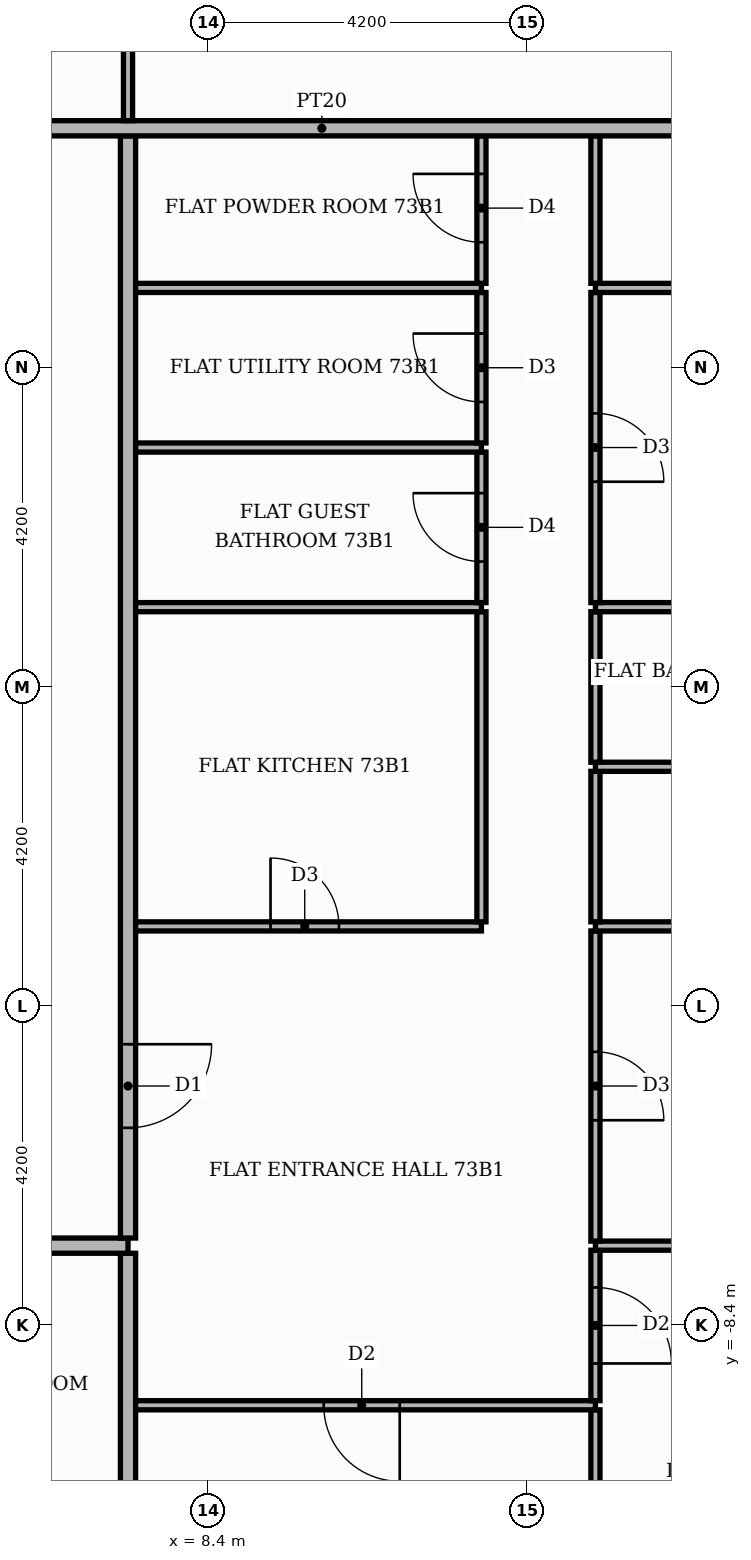
"""IFC4 building model, lengths in metres.
Left out: names, types, materials, properties, quantities, classifications, styles, units other than length and angle.
Written with IfcOpenShell. Run it as: python <this file> out.ifc"""

import sys

from ifc_helpers import new_model, si_unit, direction, frame, frame_2d, origin, place, context, subcontext, project, spatial, rectangle, extrude, element, fill, save


model = new_model("IFC4")
c1 = context("Model", 3, precision=1e-05, world=origin(), true_north=direction((0.0, 1.0)))
c2 = subcontext(c1, "Body", "Model", "MODEL_VIEW")
j1 = project(units=[si_unit("LENGTHUNIT", "METRE"), si_unit("PLANEANGLEUNIT", "RADIAN")], contexts=[c1])
p1 = place(None, origin())
s1 = spatial("IfcSite", under=j1, at=p1, CompositionType="ELEMENT")
p2 = place(p1, origin())
s2 = spatial("IfcBuilding", under=s1, at=p2, CompositionType="ELEMENT")
p3 = place(p2, frame((0.0, 0.0, 304.5)))
s3 = spatial("IfcBuildingStorey", under=s2, at=p3, CompositionType="ELEMENT", Elevation=304.5)
p4 = place(p3, frame((7.35, -18.5, 0.0), z_axis=(0.0, 0.0, 1.0), x_axis=(0.0, 1.0, 0.0)))
e1 = element("IfcWall", 1, at=p4, inside=s3, PredefinedType="PARTITIONING", context=c2, shape_type="SweptSolid", body=[
    extrude(rectangle(XDim=11.05, YDim=0.2, at=frame_2d((5.525, 0.0))), origin(), (0.0, 0.0, 1.0), 3.55),
])
p5 = place(p3, frame((13.5, -13.0, 0.0), z_axis=(0.0, 0.0, 1.0), x_axis=(0.0, 1.0, 0.0)))
e2 = element("IfcWall", 2, at=p5, inside=s3, PredefinedType="PARTITIONING", context=c2, shape_type="SweptSolid", body=[
    extrude(rectangle(XDim=3.49, YDim=0.12, at=frame_2d((1.745, 0.0))), origin(), (0.0, 0.0, 1.0), 3.55),
])
p6 = place(p3, frame((7.45, -9.45, 0.0), z_axis=(0.0, 0.0, 1.0), x_axis=(1.0, 0.0, 0.0)))
e3 = element("IfcWall", 3, at=p6, inside=s3, PredefinedType="PARTITIONING", context=c2, shape_type="SweptSolid", body=[
    extrude(rectangle(XDim=6.05, YDim=0.12, at=frame_2d((3.025, 0.0))), origin(), (0.0, 0.0, 1.0), 3.55),
])
p7 = place(p6, frame((2.475, 0.0, 0.0)))
e4 = element("IfcOpeningElement", 4, at=p7, cuts=e3, PredefinedType="OPENING", context=c2, shape_type="SweptSolid", body=[
    extrude(rectangle(XDim=1.0, YDim=2.1, at=frame_2d((0.5, 1.05))), frame((0.0, 0.07, 0.0), z_axis=(0.0, -1.0, 0.0), x_axis=(1.0, 0.0, 0.0)), (0.0, 0.0, 1.0), 0.14),
])
p8 = place(p3, frame((13.5, -9.39, 0.0), z_axis=(0.0, 0.0, 1.0), x_axis=(0.0, 1.0, 0.0)))
e5 = element("IfcWall", 5, at=p8, inside=s3, PredefinedType="PARTITIONING", context=c2, shape_type="SweptSolid", body=[
    extrude(rectangle(XDim=1.98, YDim=0.12, at=frame_2d((0.99, 0.0))), origin(), (0.0, 0.0, 1.0), 3.55),
])
p9 = place(p8, frame((0.49, 0.0, 0.0)))
e6 = element("IfcOpeningElement", 6, at=p9, cuts=e5, PredefinedType="OPENING", context=c2, shape_type="SweptSolid", body=[
    extrude(rectangle(XDim=1.0, YDim=2.1, at=frame_2d((0.5, 1.05))), frame((0.0, 0.07, 0.0), z_axis=(0.0, -1.0, 0.0), x_axis=(1.0, 0.0, 0.0)), (0.0, 0.0, 1.0), 0.14),
])
p10 = place(p3, frame((-18.5, -7.35, 0.0), z_axis=(0.0, 0.0, 1.0), x_axis=(1.0, 0.0, 0.0)))
e7 = element("IfcWall", 7, at=p10, inside=s3, PredefinedType="PARTITIONING", context=c2, shape_type="SweptSolid", body=[
    extrude(rectangle(XDim=25.85, YDim=0.2, at=frame_2d((12.925, 0.0))), origin(), (0.0, 0.0, 1.0), 3.55),
])
p11 = place(p10, frame((12.7, 0.0, 0.0)))
e8 = element("IfcOpeningElement", 8, at=p11, cuts=e7, PredefinedType="OPENING", context=c2, shape_type="SweptSolid", body=[
    extrude(rectangle(XDim=1.1, YDim=2.4, at=frame_2d((0.55, 1.2))), frame((0.0, 0.11, 0.0), z_axis=(0.0, -1.0, 0.0), x_axis=(1.0, 0.0, 0.0)), (0.0, 0.0, 1.0), 0.22),
])
p12 = place(p3, frame((13.5, -7.35, 0.0), z_axis=(0.0, 0.0, 1.0), x_axis=(1.0, 0.0, 0.0)))
e9 = element("IfcWall", 9, at=p12, inside=s3, PredefinedType="PARTITIONING", context=c2, shape_type="SweptSolid", body=[
    extrude(rectangle(XDim=5.0, YDim=0.12, at=frame_2d((2.5, 0.0))), origin(), (0.0, 0.0, 1.0), 3.55),
])
p13 = place(p3, frame((13.5, -7.29, 0.0), z_axis=(0.0, 0.0, 1.0), x_axis=(0.0, 1.0, 0.0)))
e10 = element("IfcWall", 10, at=p13, inside=s3, PredefinedType="PARTITIONING", context=c2, shape_type="SweptSolid", body=[
    extrude(rectangle(XDim=4.08, YDim=0.12, at=frame_2d((2.04, 0.0))), origin(), (0.0, 0.0, 1.0), 3.55),
])
p14 = place(p13, frame((1.59, 0.0, 0.0)))
e11 = element("IfcOpeningElement", 11, at=p14, cuts=e10, PredefinedType="OPENING", context=c2, shape_type="SweptSolid", body=[
    extrude(rectangle(XDim=0.9, YDim=2.1, at=frame_2d((0.45, 1.05))), frame((0.0, 0.07, 0.0), z_axis=(0.0, -1.0, 0.0), x_axis=(1.0, 0.0, 0.0)), (0.0, 0.0, 1.0), 0.14),
])
p15 = place(p3, frame((7.35, -7.25, 0.0), z_axis=(0.0, 0.0, 1.0), x_axis=(0.0, 1.0, 0.0)))
e12 = element("IfcWall", 12, at=p15, inside=s3, PredefinedType="PARTITIONING", context=c2, shape_type="SweptSolid", body=[
    extrude(rectangle(XDim=14.5, YDim=0.2, at=frame_2d((7.25, 0.0))), origin(), (0.0, 0.0, 1.0), 3.55),
])
p16 = place(p15, frame((1.45, 0.0, 0.0)))
e13 = element("IfcOpeningElement", 13, at=p16, cuts=e12, PredefinedType="OPENING", context=c2, shape_type="SweptSolid", body=[
    extrude(rectangle(XDim=1.1, YDim=2.4, at=frame_2d((0.55, 1.2))), frame((0.0, 0.11, 0.0), z_axis=(0.0, -1.0, 0.0), x_axis=(1.0, 0.0, 0.0)), (0.0, 0.0, 1.0), 0.22),
])
p17 = place(p3, frame((7.45, -3.15, 0.0), z_axis=(0.0, 0.0, 1.0), x_axis=(1.0, 0.0, 0.0)))
e14 = element("IfcWall", 14, at=p17, inside=s3, PredefinedType="PARTITIONING", context=c2, shape_type="SweptSolid", body=[
    extrude(rectangle(XDim=4.55, YDim=0.12, at=frame_2d((2.275, 0.0))), origin(), (0.0, 0.0, 1.0), 3.55),
])
p18 = place(p17, frame((1.775, 0.0, 0.0)))
e15 = element("IfcOpeningElement", 15, at=p18, cuts=e14, PredefinedType="OPENING", context=c2, shape_type="SweptSolid", body=[
    extrude(rectangle(XDim=0.9, YDim=2.1, at=frame_2d((0.45, 1.05))), frame((0.0, 0.07, 0.0), z_axis=(0.0, -1.0, 0.0), x_axis=(1.0, 0.0, 0.0)), (0.0, 0.0, 1.0), 0.14),
])
p19 = place(p3, frame((13.5, -3.15, 0.0), z_axis=(0.0, 0.0, 1.0), x_axis=(1.0, 0.0, 0.0)))
e16 = element("IfcWall", 16, at=p19, inside=s3, PredefinedType="PARTITIONING", context=c2, shape_type="SweptSolid", body=[
    extrude(rectangle(XDim=5.0, YDim=0.12, at=frame_2d((2.5, 0.0))), origin(), (0.0, 0.0, 1.0), 3.55),
])
p20 = place(p19, frame((2.2, 0.0, 0.0)))
e17 = element("IfcOpeningElement", 17, at=p20, cuts=e16, PredefinedType="OPENING", context=c2, shape_type="SweptSolid", body=[
    extrude(rectangle(XDim=0.9, YDim=2.1, at=frame_2d((0.45, 1.05))), frame((0.0, 0.07, 0.0), z_axis=(0.0, -1.0, 0.0), x_axis=(1.0, 0.0, 0.0)), (0.0, 0.0, 1.0), 0.14),
])
p21 = place(p3, frame((12.0, -3.09, 0.0), z_axis=(0.0, 0.0, 1.0), x_axis=(0.0, 1.0, 0.0)))
e18 = element("IfcWall", 18, at=p21, inside=s3, PredefinedType="PARTITIONING", context=c2, shape_type="SweptSolid", body=[
    extrude(rectangle(XDim=4.08, YDim=0.12, at=frame_2d((2.04, 0.0))), origin(), (0.0, 0.0, 1.0), 3.55),
])
p22 = place(p3, frame((13.5, -3.09, 0.0), z_axis=(0.0, 0.0, 1.0), x_axis=(0.0, 1.0, 0.0)))
e19 = element("IfcWall", 19, at=p22, inside=s3, PredefinedType="PARTITIONING", context=c2, shape_type="SweptSolid", body=[
    extrude(rectangle(XDim=1.98, YDim=0.12, at=frame_2d((0.99, 0.0))), origin(), (0.0, 0.0, 1.0), 3.55),
])
p23 = place(p3, frame((13.5, -1.05, 0.0), z_axis=(0.0, 0.0, 1.0), x_axis=(1.0, 0.0, 0.0)))
e20 = element("IfcWall", 20, at=p23, inside=s3, PredefinedType="PARTITIONING", context=c2, shape_type="SweptSolid", body=[
    extrude(rectangle(XDim=3.449, YDim=0.12, at=frame_2d((1.725, 0.0))), origin(), (0.0, 0.0, 1.0), 3.55),
])
p24 = place(p23, frame((1.274, 0.0, 0.0)))
e21 = element("IfcOpeningElement", 21, at=p24, cuts=e20, PredefinedType="OPENING", context=c2, shape_type="SweptSolid", body=[
    extrude(rectangle(XDim=0.9, YDim=2.1, at=frame_2d((0.45, 1.05))), frame((0.0, 0.07, 0.0), z_axis=(0.0, -1.0, 0.0), x_axis=(1.0, 0.0, 0.0)), (0.0, 0.0, 1.0), 0.14),
])
p25 = place(p3, frame((13.5, -0.99, 0.0), z_axis=(0.0, 0.0, 1.0), x_axis=(0.0, 1.0, 0.0)))
e22 = element("IfcWall", 22, at=p25, inside=s3, PredefinedType="PARTITIONING", context=c2, shape_type="SweptSolid", body=[
    extrude(rectangle(XDim=1.98, YDim=0.12, at=frame_2d((0.99, 0.0))), origin(), (0.0, 0.0, 1.0), 3.55),
])
p26 = place(p3, frame((7.45, 1.05, 0.0), z_axis=(0.0, 0.0, 1.0), x_axis=(1.0, 0.0, 0.0)))
e23 = element("IfcWall", 23, at=p26, inside=s3, PredefinedType="PARTITIONING", context=c2, shape_type="SweptSolid", body=[
    extrude(rectangle(XDim=4.55, YDim=0.12, at=frame_2d((2.275, 0.0))), origin(), (0.0, 0.0, 1.0), 3.55),
])
p27 = place(p3, frame((13.5, 1.05, 0.0), z_axis=(0.0, 0.0, 1.0), x_axis=(1.0, 0.0, 0.0)))
e24 = element("IfcWall", 24, at=p27, inside=s3, PredefinedType="PARTITIONING", context=c2, shape_type="SweptSolid", body=[
    extrude(rectangle(XDim=3.449, YDim=0.12, at=frame_2d((1.725, 0.0))), origin(), (0.0, 0.0, 1.0), 3.55),
])
p28 = place(p3, frame((12.0, 1.11, 0.0), z_axis=(0.0, 0.0, 1.0), x_axis=(0.0, 1.0, 0.0)))
e25 = element("IfcWall", 25, at=p28, inside=s3, PredefinedType="PARTITIONING", context=c2, shape_type="SweptSolid", body=[
    extrude(rectangle(XDim=1.98, YDim=0.12, at=frame_2d((0.99, 0.0))), origin(), (0.0, 0.0, 1.0), 3.55),
])
p29 = place(p28, frame((0.54, 0.0, 0.0)))
e26 = element("IfcOpeningElement", 26, at=p29, cuts=e25, PredefinedType="OPENING", context=c2, shape_type="SweptSolid", body=[
    extrude(rectangle(XDim=0.9, YDim=2.1, at=frame_2d((0.45, 1.05))), frame((0.0, 0.07, 0.0), z_axis=(0.0, -1.0, 0.0), x_axis=(1.0, 0.0, 0.0)), (0.0, 0.0, 1.0), 0.14),
])
p30 = place(p3, frame((13.5, 1.11, 0.0), z_axis=(0.0, 0.0, 1.0), x_axis=(0.0, 1.0, 0.0)))
e27 = element("IfcWall", 27, at=p30, inside=s3, PredefinedType="PARTITIONING", context=c2, shape_type="SweptSolid", body=[
    extrude(rectangle(XDim=4.08, YDim=0.12, at=frame_2d((2.04, 0.0))), origin(), (0.0, 0.0, 1.0), 3.55),
])
p31 = place(p30, frame((1.59, 0.0, 0.0)))
e28 = element("IfcOpeningElement", 28, at=p31, cuts=e27, PredefinedType="OPENING", context=c2, shape_type="SweptSolid", body=[
    extrude(rectangle(XDim=0.9, YDim=2.1, at=frame_2d((0.45, 1.05))), frame((0.0, 0.07, 0.0), z_axis=(0.0, -1.0, 0.0), x_axis=(1.0, 0.0, 0.0)), (0.0, 0.0, 1.0), 0.14),
])
p32 = place(p3, frame((7.45, 3.15, 0.0), z_axis=(0.0, 0.0, 1.0), x_axis=(1.0, 0.0, 0.0)))
e29 = element("IfcWall", 29, at=p32, inside=s3, PredefinedType="PARTITIONING", context=c2, shape_type="SweptSolid", body=[
    extrude(rectangle(XDim=4.55, YDim=0.12, at=frame_2d((2.275, 0.0))), origin(), (0.0, 0.0, 1.0), 3.55),
])
p33 = place(p3, frame((12.0, 3.21, 0.0), z_axis=(0.0, 0.0, 1.0), x_axis=(0.0, 1.0, 0.0)))
e30 = element("IfcWall", 30, at=p33, inside=s3, PredefinedType="PARTITIONING", context=c2, shape_type="SweptSolid", body=[
    extrude(rectangle(XDim=1.98, YDim=0.12, at=frame_2d((0.99, 0.0))), origin(), (0.0, 0.0, 1.0), 3.55),
])
p34 = place(p33, frame((0.54, 0.0, 0.0)))
e31 = element("IfcOpeningElement", 31, at=p34, cuts=e30, PredefinedType="OPENING", context=c2, shape_type="SweptSolid", body=[
    extrude(rectangle(XDim=0.9, YDim=2.1, at=frame_2d((0.45, 1.05))), frame((0.0, 0.07, 0.0), z_axis=(0.0, -1.0, 0.0), x_axis=(1.0, 0.0, 0.0)), (0.0, 0.0, 1.0), 0.14),
])
p35 = place(p3, frame((7.45, 5.25, 0.0), z_axis=(0.0, 0.0, 1.0), x_axis=(1.0, 0.0, 0.0)))
e32 = element("IfcWall", 32, at=p35, inside=s3, PredefinedType="PARTITIONING", context=c2, shape_type="SweptSolid", body=[
    extrude(rectangle(XDim=4.55, YDim=0.12, at=frame_2d((2.275, 0.0))), origin(), (0.0, 0.0, 1.0), 3.55),
])
p36 = place(p3, frame((13.5, 5.25, 0.0), z_axis=(0.0, 0.0, 1.0), x_axis=(1.0, 0.0, 0.0)))
e33 = element("IfcWall", 33, at=p36, inside=s3, PredefinedType="PARTITIONING", context=c2, shape_type="SweptSolid", body=[
    extrude(rectangle(XDim=5.0, YDim=0.12, at=frame_2d((2.5, 0.0))), origin(), (0.0, 0.0, 1.0), 3.55),
])
p37 = place(p36, frame((2.2, 0.0, 0.0)))
e34 = element("IfcOpeningElement", 34, at=p37, cuts=e33, PredefinedType="OPENING", context=c2, shape_type="SweptSolid", body=[
    extrude(rectangle(XDim=0.9, YDim=2.1, at=frame_2d((0.45, 1.05))), frame((0.0, 0.07, 0.0), z_axis=(0.0, -1.0, 0.0), x_axis=(1.0, 0.0, 0.0)), (0.0, 0.0, 1.0), 0.14),
])
p38 = place(p3, frame((12.0, 5.31, 0.0), z_axis=(0.0, 0.0, 1.0), x_axis=(0.0, 1.0, 0.0)))
e35 = element("IfcWall", 35, at=p38, inside=s3, PredefinedType="PARTITIONING", context=c2, shape_type="SweptSolid", body=[
    extrude(rectangle(XDim=1.94, YDim=0.12, at=frame_2d((0.97, 0.0))), origin(), (0.0, 0.0, 1.0), 3.55),
])
p39 = place(p38, frame((0.54, 0.0, 0.0)))
e36 = element("IfcOpeningElement", 36, at=p39, cuts=e35, PredefinedType="OPENING", context=c2, shape_type="SweptSolid", body=[
    extrude(rectangle(XDim=0.9, YDim=2.1, at=frame_2d((0.45, 1.05))), frame((0.0, 0.07, 0.0), z_axis=(0.0, -1.0, 0.0), x_axis=(1.0, 0.0, 0.0)), (0.0, 0.0, 1.0), 0.14),
])
p40 = place(p3, frame((13.5, 5.31, 0.0), z_axis=(0.0, 0.0, 1.0), x_axis=(0.0, 1.0, 0.0)))
e37 = element("IfcWall", 37, at=p40, inside=s3, PredefinedType="PARTITIONING", context=c2, shape_type="SweptSolid", body=[
    extrude(rectangle(XDim=1.94, YDim=0.12, at=frame_2d((0.97, 0.0))), origin(), (0.0, 0.0, 1.0), 3.55),
])
p41 = place(p3, frame((1.3, 7.35, 0.0), z_axis=(0.0, 0.0, 1.0), x_axis=(1.0, 0.0, 0.0)))
e38 = element("IfcWall", 38, at=p41, inside=s3, PredefinedType="PARTITIONING", context=c2, shape_type="SweptSolid", body=[
    extrude(rectangle(XDim=17.2, YDim=0.2, at=frame_2d((8.6, 0.0))), origin(), (0.0, 0.0, 1.0), 3.55),
])
p42 = place(p41, frame((2.475, 0.0, 0.0)))
e39 = element("IfcOpeningElement", 39, at=p42, cuts=e38, PredefinedType="OPENING", context=c2, shape_type="SweptSolid", body=[
    extrude(rectangle(XDim=1.1, YDim=2.4, at=frame_2d((0.55, 1.2))), frame((0.0, 0.11, 0.0), z_axis=(0.0, -1.0, 0.0), x_axis=(1.0, 0.0, 0.0)), (0.0, 0.0, 1.0), 0.22),
])
p43 = place(p3, frame((7.35, 7.45, 0.0), z_axis=(0.0, 0.0, 1.0), x_axis=(0.0, 1.0, 0.0)))
e40 = element("IfcWall", 40, at=p43, inside=s3, PredefinedType="PARTITIONING", context=c2, shape_type="SweptSolid", body=[
    extrude(rectangle(XDim=6.29, YDim=0.12, at=frame_2d((3.145, 0.0))), origin(), (0.0, 0.0, 1.0), 3.55),
])
p44 = place(p43, frame((2.625, 0.0, 0.0)))
e41 = element("IfcOpeningElement", 41, at=p44, cuts=e40, PredefinedType="OPENING", context=c2, shape_type="SweptSolid", body=[
    extrude(rectangle(XDim=1.0, YDim=2.1, at=frame_2d((0.5, 1.05))), frame((0.0, 0.07, 0.0), z_axis=(0.0, -1.0, 0.0), x_axis=(1.0, 0.0, 0.0)), (0.0, 0.0, 1.0), 0.14),
])
p45 = place(p16, frame((1.1, 0.0, 0.0), z_axis=(0.0, 0.0, 1.0), x_axis=(-1.0, 0.0, 0.0)))
e42 = element("IfcDoor", 42, at=p45, inside=s3, OperationType="SINGLE_SWING_RIGHT", PredefinedType="DOOR", context=c2, shape_type="SweptSolid", body=[
    extrude(rectangle(XDim=1.1, YDim=2.4, at=frame_2d((0.55, 1.2))), frame((0.0, 0.025, 0.0), z_axis=(0.0, -1.0, 0.0), x_axis=(1.0, 0.0, 0.0)), (0.0, 0.0, 1.0), 0.05),
])
fill(e13, e42)
p46 = place(p7, frame((1.0, 0.0, 0.0), z_axis=(0.0, 0.0, 1.0), x_axis=(-1.0, 0.0, 0.0)))
e43 = element("IfcDoor", 43, at=p46, inside=s3, OperationType="SINGLE_SWING_RIGHT", PredefinedType="DOOR", context=c2, shape_type="SweptSolid", body=[
    extrude(rectangle(XDim=1.0, YDim=2.1, at=frame_2d((0.5, 1.05))), frame((0.0, 0.025, 0.0), z_axis=(0.0, -1.0, 0.0), x_axis=(1.0, 0.0, 0.0)), (0.0, 0.0, 1.0), 0.05),
])
fill(e4, e43)
p47 = place(p18, origin())
e44 = element("IfcDoor", 44, at=p47, inside=s3, OperationType="SINGLE_SWING_LEFT", PredefinedType="DOOR", context=c2, shape_type="SweptSolid", body=[
    extrude(rectangle(XDim=0.9, YDim=2.1, at=frame_2d((0.45, 1.05))), frame((0.0, 0.025, 0.0), z_axis=(0.0, -1.0, 0.0), x_axis=(1.0, 0.0, 0.0)), (0.0, 0.0, 1.0), 0.05),
])
fill(e15, e44)
p48 = place(p29, origin())
e45 = element("IfcDoor", 45, at=p48, inside=s3, OperationType="SINGLE_SWING_RIGHT", PredefinedType="DOOR", context=c2, shape_type="SweptSolid", body=[
    extrude(rectangle(XDim=0.9, YDim=2.1, at=frame_2d((0.45, 1.05))), frame((0.0, 0.025, 0.0), z_axis=(0.0, -1.0, 0.0), x_axis=(1.0, 0.0, 0.0)), (0.0, 0.0, 1.0), 0.05),
])
fill(e26, e45)
p49 = place(p34, origin())
e46 = element("IfcDoor", 46, at=p49, inside=s3, OperationType="SINGLE_SWING_RIGHT", PredefinedType="DOOR", context=c2, shape_type="SweptSolid", body=[
    extrude(rectangle(XDim=0.9, YDim=2.1, at=frame_2d((0.45, 1.05))), frame((0.0, 0.025, 0.0), z_axis=(0.0, -1.0, 0.0), x_axis=(1.0, 0.0, 0.0)), (0.0, 0.0, 1.0), 0.05),
])
fill(e31, e46)
p50 = place(p39, origin())
e47 = element("IfcDoor", 47, at=p50, inside=s3, OperationType="SINGLE_SWING_RIGHT", PredefinedType="DOOR", context=c2, shape_type="SweptSolid", body=[
    extrude(rectangle(XDim=0.9, YDim=2.1, at=frame_2d((0.45, 1.05))), frame((0.0, 0.025, 0.0), z_axis=(0.0, -1.0, 0.0), x_axis=(1.0, 0.0, 0.0)), (0.0, 0.0, 1.0), 0.05),
])
fill(e36, e47)
p51 = place(p9, frame((1.0, 0.0, 0.0), z_axis=(0.0, 0.0, 1.0), x_axis=(-1.0, 0.0, 0.0)))
e48 = element("IfcDoor", 48, at=p51, inside=s3, OperationType="SINGLE_SWING_LEFT", PredefinedType="DOOR", context=c2, shape_type="SweptSolid", body=[
    extrude(rectangle(XDim=1.0, YDim=2.1, at=frame_2d((0.5, 1.05))), frame((0.0, 0.025, 0.0), z_axis=(0.0, -1.0, 0.0), x_axis=(1.0, 0.0, 0.0)), (0.0, 0.0, 1.0), 0.05),
])
fill(e6, e48)
p52 = place(p14, frame((0.9, 0.0, 0.0), z_axis=(0.0, 0.0, 1.0), x_axis=(-1.0, 0.0, 0.0)))
e49 = element("IfcDoor", 49, at=p52, inside=s3, OperationType="SINGLE_SWING_LEFT", PredefinedType="DOOR", context=c2, shape_type="SweptSolid", body=[
    extrude(rectangle(XDim=0.9, YDim=2.1, at=frame_2d((0.45, 1.05))), frame((0.0, 0.025, 0.0), z_axis=(0.0, -1.0, 0.0), x_axis=(1.0, 0.0, 0.0)), (0.0, 0.0, 1.0), 0.05),
])
fill(e11, e49)
p53 = place(p31, frame((0.9, 0.0, 0.0), z_axis=(0.0, 0.0, 1.0), x_axis=(-1.0, 0.0, 0.0)))
e50 = element("IfcDoor", 50, at=p53, inside=s3, OperationType="SINGLE_SWING_LEFT", PredefinedType="DOOR", context=c2, shape_type="SweptSolid", body=[
    extrude(rectangle(XDim=0.9, YDim=2.1, at=frame_2d((0.45, 1.05))), frame((0.0, 0.025, 0.0), z_axis=(0.0, -1.0, 0.0), x_axis=(1.0, 0.0, 0.0)), (0.0, 0.0, 1.0), 0.05),
])
fill(e28, e50)
save(model, sys.argv[1])
